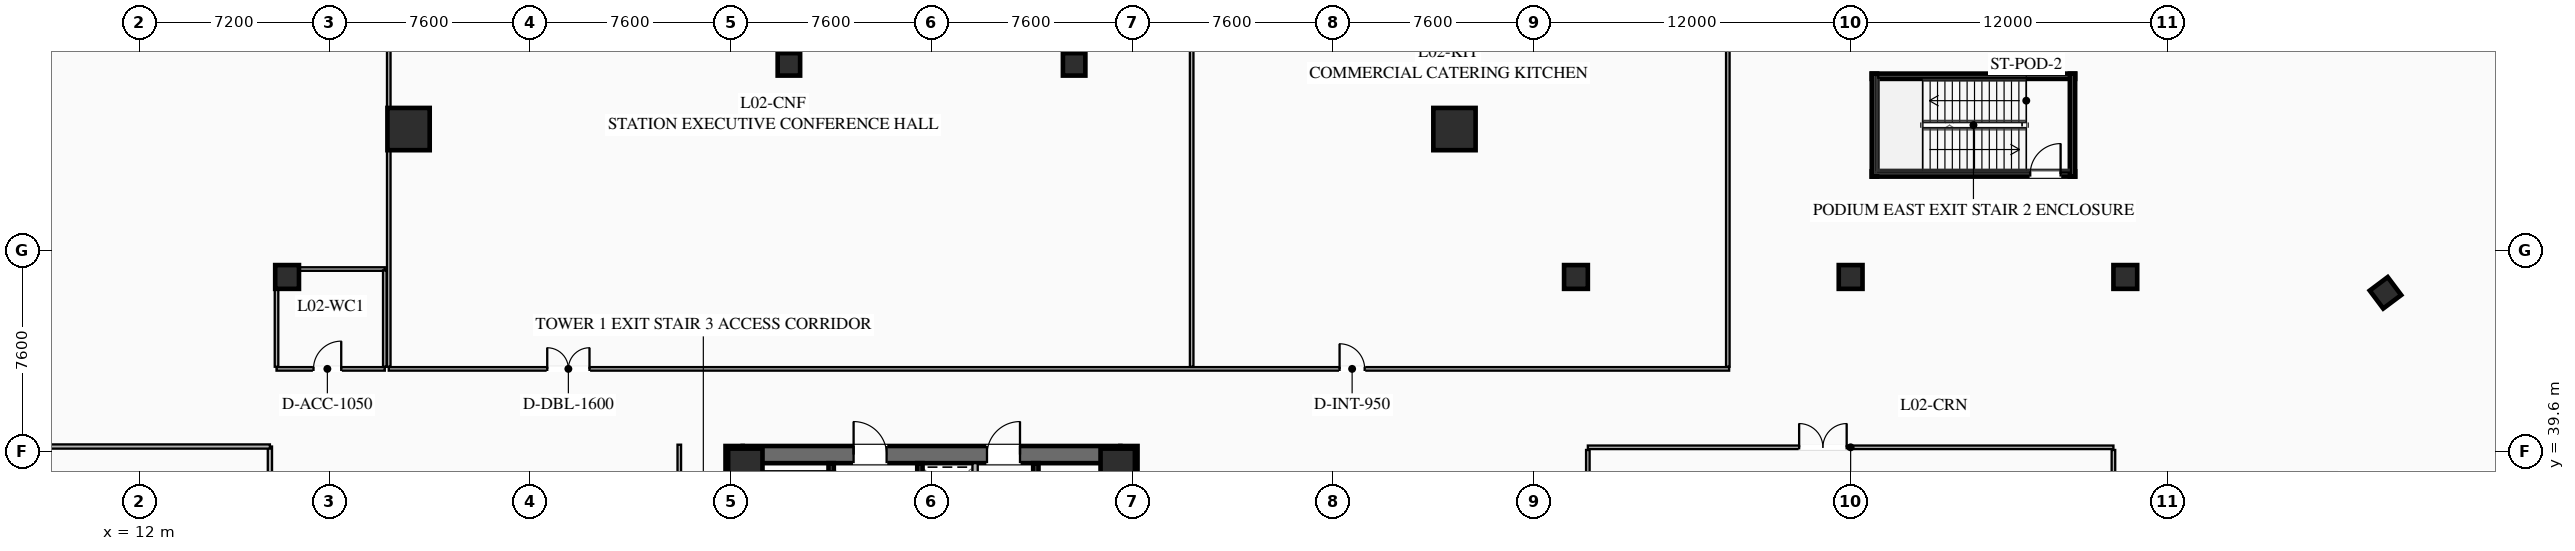
"""IFC4 building model, lengths in metres.
Left out: names, types, materials, properties, quantities, classifications, styles, units other than length and angle.
Written with IfcOpenShell. Run it as: python <this file> out.ifc"""

import sys

from ifc_helpers import new_model, si_unit, direction, frame, frame_2d, origin, origin_2d, place, context, subcontext, project, spatial, rectangle, hollow_rectangle, extrude, element, fill, save


model = new_model("IFC4")
c1 = context("Model", 3, precision=1e-05, world=origin(), true_north=direction((0.0, 1.0)))
c2 = subcontext(c1, "Body", "Model", "MODEL_VIEW")
j1 = project(units=[si_unit("LENGTHUNIT", "METRE"), si_unit("PLANEANGLEUNIT", "RADIAN")], contexts=[c1])
p1 = place(None, origin())
s1 = spatial("IfcSite", under=j1, at=p1, CompositionType="ELEMENT")
p2 = place(p1, origin())
s2 = spatial("IfcBuilding", under=s1, at=p2, CompositionType="ELEMENT")
p3 = place(p2, frame((0.0, 0.0, 10.2)))
s3 = spatial("IfcBuildingStorey", under=s2, at=p3, CompositionType="ELEMENT", Elevation=10.2)
for number, where, z_axis, x_axis in (
    (1, (34.525, 24.2, 0.0), (0.0, 0.0, 1.0), (0.0, 1.0, 0.0)),
    (2, (49.475, 39.8, 0.0), (0.0, 0.0, 1.0), (0.0, -1.0, 0.0)),
):
    element("IfcWall", number, at=place(p3, frame(where, z_axis=z_axis, x_axis=x_axis)), inside=s3, PredefinedType="SHEAR", context=c2, shape_type="SweptSolid", body=[
        extrude(rectangle(XDim=15.6, YDim=0.65, at=frame_2d((7.8, 0.0))), origin(), (0.0, 0.0, 1.0), 5.4),
    ])
p4 = place(p3, frame((34.85, 39.475, 0.0), z_axis=(0.0, 0.0, 1.0), x_axis=(1.0, 0.0, 0.0)))
e3 = element("IfcWall", 3, at=p4, inside=s3, PredefinedType="SHEAR", context=c2, shape_type="SweptSolid", body=[
    extrude(rectangle(XDim=14.3, YDim=0.65, at=frame_2d((7.15, 0.0))), origin(), (0.0, 0.0, 1.0), 5.4),
])
p5 = place(p4, frame((4.2, 0.0, 0.0)))
e4 = element("IfcOpeningElement", 4, at=p5, cuts=e3, PredefinedType="OPENING", context=c2, shape_type="SweptSolid", body=[
    extrude(rectangle(XDim=1.25, YDim=2.25, at=frame_2d((0.625, 1.125))), frame((0.0, 0.335, 0.0), z_axis=(0.0, -1.0, 0.0), x_axis=(1.0, 0.0, 0.0)), (0.0, 0.0, 1.0), 0.67),
])
p6 = place(p4, frame((9.25, 0.0, 0.0)))
e5 = element("IfcOpeningElement", 5, at=p6, cuts=e3, PredefinedType="OPENING", context=c2, shape_type="SweptSolid", body=[
    extrude(rectangle(XDim=1.25, YDim=2.25, at=frame_2d((0.625, 1.125))), frame((0.0, 0.335, 0.0), z_axis=(0.0, -1.0, 0.0), x_axis=(1.0, 0.0, 0.0)), (0.0, 0.0, 1.0), 0.67),
])
for number, where, z_axis, x_axis in (
    (6, (49.05, 39.05, 0.0), (0.0, 0.0, 1.0), (1.0, 0.0, 0.0)),
    (7, (34.95, 39.05, 0.0), (0.0, 0.0, 1.0), (1.0, 0.0, 0.0)),
):
    element("IfcColumn", number, at=place(p3, frame(where, z_axis=z_axis, x_axis=x_axis)), inside=s3, PredefinedType="COLUMN", context=c2, shape_type="SweptSolid", body=[
        extrude(hollow_rectangle(XDim=1.3, YDim=1.3, WallThickness=0.05, at=origin_2d()), origin(), (0.0, 0.0, 1.0), 5.14),
    ])
for number, where, z_axis, x_axis in (
    (8, (61.8, 51.8, 0.0), (0.0, 0.0, 1.0), (1.0, 0.0, 0.0)),
    (9, (22.2, 51.8, 0.0), (0.0, 0.0, 1.0), (1.0, 0.0, 0.0)),
):
    element("IfcColumn", number, at=place(p3, frame(where, z_axis=z_axis, x_axis=x_axis)), inside=s3, PredefinedType="COLUMN", context=c2, shape_type="SweptSolid", body=[
        extrude(hollow_rectangle(XDim=1.6, YDim=1.6, WallThickness=0.06, at=origin_2d()), origin(), (0.0, 0.0, 1.0), 5.14),
    ])
for number, where, z_axis, x_axis in (
    (10, (47.4, 54.25, 0.0), (0.0, 0.0, 1.0), (1.0, 0.0, 0.0)),
    (11, (36.6, 54.25, 0.0), (0.0, 0.0, 1.0), (1.0, 0.0, 0.0)),
    (12, (97.05, 45.6, 0.0), (0.0, 0.0, 1.0), (0.8, 0.6, 0.0)),
):
    element("IfcColumn", number, at=place(p3, frame(where, z_axis=z_axis, x_axis=x_axis)), inside=s3, PredefinedType="COLUMN", context=c2, shape_type="SweptSolid", body=[
        extrude(hollow_rectangle(XDim=0.85, YDim=0.85, WallThickness=0.035, at=origin_2d()), origin(), (0.0, 0.0, 1.0), 5.14),
    ])
for number, where, z_axis, x_axis in (
    (13, (17.6, 46.2, 0.0), (0.0, 0.0, 1.0), (1.0, 0.0, 0.0)),
    (14, (66.4, 46.2, 0.0), (0.0, 0.0, 1.0), (1.0, 0.0, 0.0)),
    (15, (76.8, 46.2, 0.0), (0.0, 0.0, 1.0), (1.0, 0.0, 0.0)),
    (16, (87.2, 46.2, 0.0), (0.0, 0.0, 1.0), (1.0, 0.0, 0.0)),
):
    element("IfcColumn", number, at=place(p3, frame(where, z_axis=z_axis, x_axis=x_axis)), inside=s3, PredefinedType="COLUMN", context=c2, shape_type="SweptSolid", body=[
        extrude(rectangle(XDim=0.9, YDim=0.9, at=origin_2d()), origin(), (0.0, 0.0, 1.0), 5.14),
    ])
p7 = place(p3, frame((38.2, 31.2, 0.0), z_axis=(0.0, 0.0, 1.0), x_axis=(0.0, 1.0, 0.0)))
e17 = element("IfcWall", 17, at=p7, inside=s3, PredefinedType="SHEAR", context=c2, shape_type="SweptSolid", body=[
    extrude(rectangle(XDim=7.95, YDim=0.2, at=frame_2d((3.975, 0.0))), origin(), (0.0, 0.0, 1.0), 5.14),
])
p8 = place(p7, frame((0.45, 0.0, 0.0)))
e18 = element("IfcOpeningElement", 18, at=p8, cuts=e17, PredefinedType="OPENING", context=c2, shape_type="SweptSolid", body=[
    extrude(rectangle(XDim=1.15, YDim=2.2, at=frame_2d((0.575, 1.1))), frame((0.0, 0.11, 0.0), z_axis=(0.0, -1.0, 0.0), x_axis=(1.0, 0.0, 0.0)), (0.0, 0.0, 1.0), 0.22),
])
p9 = place(p3, frame((41.56, 24.85, 0.0), z_axis=(0.0, 0.0, 1.0), x_axis=(0.0, 1.0, 0.0)))
e19 = element("IfcWall", 19, at=p9, inside=s3, PredefinedType="SHEAR", context=c2, shape_type="SweptSolid", body=[
    extrude(rectangle(XDim=14.3, YDim=0.2, at=frame_2d((7.15, 0.0))), origin(), (0.0, 0.0, 1.0), 5.14),
])
p10 = place(p3, frame((45.95, 39.15, 0.0), z_axis=(0.0, 0.0, 1.0), x_axis=(0.0, -1.0, 0.0)))
e20 = element("IfcWall", 20, at=p10, inside=s3, PredefinedType="SHEAR", context=c2, shape_type="SweptSolid", body=[
    extrude(rectangle(XDim=6.35, YDim=0.2, at=frame_2d((3.175, 0.0))), origin(), (0.0, 0.0, 1.0), 5.14),
])
p11 = place(p3, frame((43.65, 32.35, 0.0), z_axis=(0.0, 0.0, 1.0), x_axis=(0.0, 1.0, 0.0)))
e21 = element("IfcWall", 21, at=p11, inside=s3, PredefinedType="SOLIDWALL", context=c2, shape_type="SweptSolid", body=[
    extrude(rectangle(XDim=6.8, YDim=0.2, at=frame_2d((3.4, 0.0))), origin(), (0.0, 0.0, 1.0), 5.14),
])
p12 = place(p3, frame((32.45, 35.4, 0.0), z_axis=(0.0, 0.0, 1.0), x_axis=(0.0, 1.0, 0.0)))
e22 = element("IfcWall", 22, at=p12, inside=s3, PredefinedType="PARTITIONING", context=c2, shape_type="SweptSolid", body=[
    extrude(rectangle(XDim=4.45, YDim=0.135, at=frame_2d((2.225, 0.0))), origin(), (0.0, 0.0, 1.0), 2.71),
])
p13 = place(p3, frame((77.6, 50.1, 0.0), z_axis=(0.0, 0.0, 1.0), x_axis=(1.0, 0.0, 0.0)))
e23 = element("IfcWall", 23, at=p13, inside=s3, PredefinedType="SHEAR", context=c2, shape_type="SweptSolid", body=[
    extrude(rectangle(XDim=7.7, YDim=0.2, at=frame_2d((3.85, 0.0))), origin(), (0.0, 0.0, 1.0), 5.14),
])
p14 = place(p13, frame((6.0, 0.0, 0.0)))
e24 = element("IfcOpeningElement", 24, at=p14, cuts=e23, PredefinedType="OPENING", context=c2, shape_type="SweptSolid", body=[
    extrude(rectangle(XDim=1.15, YDim=2.2, at=frame_2d((0.575, 1.1))), frame((0.0, 0.11, 0.0), z_axis=(0.0, -1.0, 0.0), x_axis=(1.0, 0.0, 0.0)), (0.0, 0.0, 1.0), 0.22),
])
p15 = place(p3, frame((77.6, 53.8, 0.0), z_axis=(0.0, 0.0, 1.0), x_axis=(1.0, 0.0, 0.0)))
e25 = element("IfcWall", 25, at=p15, inside=s3, PredefinedType="SHEAR", context=c2, shape_type="SweptSolid", body=[
    extrude(rectangle(XDim=7.7, YDim=0.2, at=frame_2d((3.85, 0.0))), origin(), (0.0, 0.0, 1.0), 5.14),
])
for number, where, z_axis, x_axis in (
    (26, (77.7, 50.0, 0.0), (0.0, 0.0, 1.0), (0.0, 1.0, 0.0)),
    (27, (85.2, 50.0, 0.0), (0.0, 0.0, 1.0), (0.0, 1.0, 0.0)),
):
    element("IfcWall", number, at=place(p3, frame(where, z_axis=z_axis, x_axis=x_axis)), inside=s3, PredefinedType="SHEAR", context=c2, shape_type="SweptSolid", body=[
        extrude(rectangle(XDim=3.9, YDim=0.2, at=frame_2d((1.95, 0.0))), origin(), (0.0, 0.0, 1.0), 5.14),
    ])
p16 = place(p3, frame((16.95, 24.35, 0.0), z_axis=(0.0, 0.0, 1.0), x_axis=(0.0, 1.0, 0.0)))
e28 = element("IfcWall", 28, at=p16, inside=s3, PredefinedType="PARTITIONING", context=c2, shape_type="SweptSolid", body=[
    extrude(rectangle(XDim=15.43, YDim=0.16, at=frame_2d((7.715, 0.0))), origin(), (0.0, 0.0, 1.0), 2.71),
])
p17 = place(p3, frame((0.35, 39.78, 0.0), z_axis=(0.0, 0.0, 1.0), x_axis=(1.0, 0.0, 0.0)))
e29 = element("IfcWall", 29, at=p17, inside=s3, PredefinedType="PARTITIONING", context=c2, shape_type="SweptSolid", body=[
    extrude(rectangle(XDim=16.6, YDim=0.16, at=frame_2d((8.3, 0.0))), origin(), (0.0, 0.0, 1.0), 2.71),
])
p18 = place(p3, frame((66.85, 39.75, 0.0), z_axis=(0.0, 0.0, 1.0), x_axis=(1.0, 0.0, 0.0)))
e30 = element("IfcWall", 30, at=p18, inside=s3, PredefinedType="PARTITIONING", context=c2, shape_type="SweptSolid", body=[
    extrude(rectangle(XDim=19.9, YDim=0.135, at=frame_2d((9.95, 0.0))), origin(), (0.0, 0.0, 1.0), 2.71),
])
p19 = place(p18, frame((8.0, 0.0, 0.0)))
e31 = element("IfcOpeningElement", 31, at=p19, cuts=e30, PredefinedType="OPENING", context=c2, shape_type="SweptSolid", body=[
    extrude(rectangle(XDim=1.8, YDim=2.4, at=frame_2d((0.9, 1.2))), frame((0.0, 0.077, 0.0), z_axis=(0.0, -1.0, 0.0), x_axis=(1.0, 0.0, 0.0)), (0.0, 0.0, 1.0), 0.155),
])
for number, where, z_axis, x_axis in (
    (32, (66.85, 24.35, 0.0), (0.0, 0.0, 1.0), (0.0, 1.0, 0.0)),
    (33, (86.75, 24.35, 0.0), (0.0, 0.0, 1.0), (0.0, 1.0, 0.0)),
):
    element("IfcWall", number, at=place(p3, frame(where, z_axis=z_axis, x_axis=x_axis)), inside=s3, PredefinedType="PARTITIONING", context=c2, shape_type="SweptSolid", body=[
        extrude(rectangle(XDim=15.3, YDim=0.135, at=frame_2d((7.65, 0.0))), origin(), (0.0, 0.0, 1.0), 2.71),
    ])
p20 = place(p3, frame((21.45, 42.72, 0.0), z_axis=(0.0, 0.0, 1.0), x_axis=(1.0, 0.0, 0.0)))
e34 = element("IfcWall", 34, at=p20, inside=s3, PredefinedType="PARTITIONING", context=c2, shape_type="SweptSolid", body=[
    extrude(rectangle(XDim=50.75, YDim=0.135, at=frame_2d((25.375, 0.0))), origin(), (0.0, 0.0, 1.0), 2.71),
])
p21 = place(p20, frame((6.0, 0.0, 0.0)))
e35 = element("IfcOpeningElement", 35, at=p21, cuts=e34, PredefinedType="OPENING", context=c2, shape_type="SweptSolid", body=[
    extrude(rectangle(XDim=1.6, YDim=2.25, at=frame_2d((0.8, 1.125))), frame((0.0, 0.077, 0.0), z_axis=(0.0, -1.0, 0.0), x_axis=(1.0, 0.0, 0.0)), (0.0, 0.0, 1.0), 0.155),
])
p22 = place(p20, frame((36.0, 0.0, 0.0)))
e36 = element("IfcOpeningElement", 36, at=p22, cuts=e34, PredefinedType="OPENING", context=c2, shape_type="SweptSolid", body=[
    extrude(rectangle(XDim=0.95, YDim=2.05, at=frame_2d((0.475, 1.025))), frame((0.0, 0.077, 0.0), z_axis=(0.0, -1.0, 0.0), x_axis=(1.0, 0.0, 0.0)), (0.0, 0.0, 1.0), 0.155),
])
for number, where, z_axis, x_axis in (
    (37, (21.45, 42.8, 0.0), (0.0, 0.0, 1.0), (0.0, 1.0, 0.0)),
    (38, (51.85, 42.8, 0.0), (0.0, 0.0, 1.0), (0.0, 1.0, 0.0)),
    (39, (72.15, 42.8, 0.0), (0.0, 0.0, 1.0), (0.0, 1.0, 0.0)),
):
    element("IfcWall", number, at=place(p3, frame(where, z_axis=z_axis, x_axis=x_axis)), inside=s3, PredefinedType="PARTITIONING", context=c2, shape_type="SweptSolid", body=[
        extrude(rectangle(XDim=20.85, YDim=0.135, at=frame_2d((10.425, 0.0))), origin(), (0.0, 0.0, 1.0), 2.71),
    ])
p23 = place(p3, frame((17.2, 42.72, 0.0), z_axis=(0.0, 0.0, 1.0), x_axis=(1.0, 0.0, 0.0)))
e40 = element("IfcWall", 40, at=p23, inside=s3, PredefinedType="PARTITIONING", context=c2, shape_type="SweptSolid", body=[
    extrude(rectangle(XDim=4.1, YDim=0.135, at=frame_2d((2.05, 0.0))), origin(), (0.0, 0.0, 1.0), 2.71),
])
p24 = place(p23, frame((1.4, 0.0, 0.0)))
e41 = element("IfcOpeningElement", 41, at=p24, cuts=e40, PredefinedType="OPENING", context=c2, shape_type="SweptSolid", body=[
    extrude(rectangle(XDim=1.05, YDim=2.2, at=frame_2d((0.525, 1.1))), frame((0.0, 0.077, 0.0), z_axis=(0.0, -1.0, 0.0), x_axis=(1.0, 0.0, 0.0)), (0.0, 0.0, 1.0), 0.155),
])
p25 = place(p3, frame((17.2, 46.5, 0.0), z_axis=(0.0, 0.0, 1.0), x_axis=(1.0, 0.0, 0.0)))
e42 = element("IfcWall", 42, at=p25, inside=s3, PredefinedType="PARTITIONING", context=c2, shape_type="SweptSolid", body=[
    extrude(rectangle(XDim=4.1, YDim=0.135, at=frame_2d((2.05, 0.0))), origin(), (0.0, 0.0, 1.0), 2.71),
])
for number, where, z_axis, x_axis in (
    (43, (17.2, 42.8, 0.0), (0.0, 0.0, 1.0), (0.0, 1.0, 0.0)),
    (44, (21.3, 42.8, 0.0), (0.0, 0.0, 1.0), (0.0, 1.0, 0.0)),
):
    element("IfcWall", number, at=place(p3, frame(where, z_axis=z_axis, x_axis=x_axis)), inside=s3, PredefinedType="PARTITIONING", context=c2, shape_type="SweptSolid", body=[
        extrude(rectangle(XDim=3.65, YDim=0.135, at=frame_2d((1.825, 0.0))), origin(), (0.0, 0.0, 1.0), 2.71),
    ])
p26 = place(p5, origin())
e45 = element("IfcDoor", 45, at=p26, inside=s3, OperationType="SINGLE_SWING_LEFT", PredefinedType="DOOR", context=c2, shape_type="SweptSolid", body=[
    extrude(rectangle(XDim=1.25, YDim=2.25, at=frame_2d((0.625, 1.125))), frame((0.0, 0.025, 0.0), z_axis=(0.0, -1.0, 0.0), x_axis=(1.0, 0.0, 0.0)), (0.0, 0.0, 1.0), 0.05),
])
fill(e4, e45)
p27 = place(p6, origin())
e46 = element("IfcDoor", 46, at=p27, inside=s3, OperationType="SINGLE_SWING_RIGHT", PredefinedType="DOOR", context=c2, shape_type="SweptSolid", body=[
    extrude(rectangle(XDim=1.25, YDim=2.25, at=frame_2d((0.625, 1.125))), frame((0.0, 0.025, 0.0), z_axis=(0.0, -1.0, 0.0), x_axis=(1.0, 0.0, 0.0)), (0.0, 0.0, 1.0), 0.05),
])
fill(e5, e46)
p28 = place(p14, origin())
e47 = element("IfcDoor", 47, at=p28, inside=s3, OperationType="SINGLE_SWING_RIGHT", PredefinedType="DOOR", context=c2, shape_type="SweptSolid", body=[
    extrude(rectangle(XDim=1.15, YDim=2.2, at=frame_2d((0.575, 1.1))), frame((0.0, 0.025, 0.0), z_axis=(0.0, -1.0, 0.0), x_axis=(1.0, 0.0, 0.0)), (0.0, 0.0, 1.0), 0.05),
])
fill(e24, e47)
p29 = place(p19, origin())
e48 = element("IfcDoor", 48, at=p29, inside=s3, OperationType="DOUBLE_DOOR_SINGLE_SWING", PredefinedType="DOOR", context=c2, shape_type="SweptSolid", body=[
    extrude(rectangle(XDim=1.8, YDim=2.4, at=frame_2d((0.9, 1.2))), frame((0.0, 0.025, 0.0), z_axis=(0.0, -1.0, 0.0), x_axis=(1.0, 0.0, 0.0)), (0.0, 0.0, 1.0), 0.05),
])
fill(e31, e48)
p30 = place(p21, origin())
e49 = element("IfcDoor", 49, at=p30, inside=s3, OperationType="DOUBLE_DOOR_SINGLE_SWING", PredefinedType="DOOR", context=c2, shape_type="SweptSolid", body=[
    extrude(rectangle(XDim=1.6, YDim=2.25, at=frame_2d((0.8, 1.125))), frame((0.0, 0.025, 0.0), z_axis=(0.0, -1.0, 0.0), x_axis=(1.0, 0.0, 0.0)), (0.0, 0.0, 1.0), 0.05),
])
fill(e35, e49)
p31 = place(p22, origin())
e50 = element("IfcDoor", 50, at=p31, inside=s3, OperationType="SINGLE_SWING_LEFT", PredefinedType="DOOR", context=c2, shape_type="SweptSolid", body=[
    extrude(rectangle(XDim=0.95, YDim=2.05, at=frame_2d((0.475, 1.025))), frame((0.0, 0.025, 0.0), z_axis=(0.0, -1.0, 0.0), x_axis=(1.0, 0.0, 0.0)), (0.0, 0.0, 1.0), 0.05),
])
fill(e36, e50)
p32 = place(p24, origin())
e51 = element("IfcDoor", 51, at=p32, inside=s3, OperationType="SINGLE_SWING_RIGHT", PredefinedType="DOOR", context=c2, shape_type="SweptSolid", body=[
    extrude(rectangle(XDim=1.05, YDim=2.2, at=frame_2d((0.525, 1.1))), frame((0.0, 0.025, 0.0), z_axis=(0.0, -1.0, 0.0), x_axis=(1.0, 0.0, 0.0)), (0.0, 0.0, 1.0), 0.05),
])
fill(e41, e51)
save(model, sys.argv[1])
